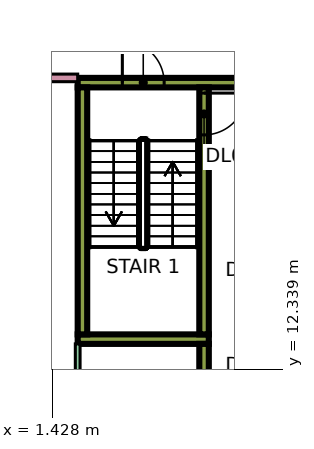
"""IFC4 building model, lengths in metres.
Left out: names, types, materials, properties, quantities, classifications, styles, units other than length and angle.
Written with IfcOpenShell. Run it as: python <this file> out.ifc"""

import sys

from ifc_helpers import new_model, si_unit, direction, frame, frame_2d, origin, place, context, subcontext, project, spatial, rectangle, extrude, element, fill, save


model = new_model("IFC4")
c1 = context("Model", 3, precision=1e-05, world=origin(), true_north=direction((0.0, 1.0)))
c2 = subcontext(c1, "Body", "Model", "MODEL_VIEW")
j1 = project(units=[si_unit("LENGTHUNIT", "METRE"), si_unit("PLANEANGLEUNIT", "RADIAN")], contexts=[c1])
p1 = place(None, origin())
s1 = spatial("IfcSite", under=j1, at=p1, CompositionType="ELEMENT")
p2 = place(p1, origin())
s2 = spatial("IfcBuilding", under=s1, at=p2, CompositionType="ELEMENT")
p3 = place(p2, origin())
s3 = spatial("IfcBuildingStorey", under=s2, at=p3, CompositionType="ELEMENT", Elevation=0.0)
p4 = place(p3, frame((2.1, 19.875, 0.0), z_axis=(0.0, 0.0, 1.0), x_axis=(1.0, 0.0, 0.0)))
e1 = element("IfcWall", 1, at=p4, inside=s3, PredefinedType="SHEAR", context=c2, shape_type="SweptSolid", body=[
    extrude(rectangle(XDim=6.9, YDim=0.25, at=frame_2d((3.45, 0.0))), origin(), (0.0, 0.0, 1.0), 7.2),
])
p5 = place(p4, frame((1.175, 0.0, 0.0)))
e2 = element("IfcOpeningElement", 2, at=p5, cuts=e1, PredefinedType="OPENING", context=c2, shape_type="SweptSolid", body=[
    extrude(rectangle(XDim=1.1, YDim=2.2, at=frame_2d((0.55, 1.1))), frame((0.0, 0.135, 0.0), z_axis=(0.0, -1.0, 0.0), x_axis=(1.0, 0.0, 0.0)), (0.0, 0.0, 1.0), 0.27),
])
p6 = place(p4, frame((4.6, 0.0, 0.0)))
e3 = element("IfcOpeningElement", 3, at=p6, cuts=e1, PredefinedType="OPENING", context=c2, shape_type="SweptSolid", body=[
    extrude(rectangle(XDim=1.2, YDim=2.2, at=frame_2d((0.6, 1.1))), frame((0.0, 0.135, 0.0), z_axis=(0.0, -1.0, 0.0), x_axis=(1.0, 0.0, 0.0)), (0.0, 0.0, 1.0), 0.27),
])
p7 = place(p3, frame((2.1, 13.125, 0.0), z_axis=(0.0, 0.0, 1.0), x_axis=(1.0, 0.0, 0.0)))
e4 = element("IfcWall", 4, at=p7, inside=s3, PredefinedType="SHEAR", context=c2, shape_type="SweptSolid", body=[
    extrude(rectangle(XDim=3.45, YDim=0.25, at=frame_2d((1.725, 0.0))), origin(), (0.0, 0.0, 1.0), 7.2),
])
p8 = place(p3, frame((2.225, 13.25, 0.0), z_axis=(0.0, 0.0, 1.0), x_axis=(0.0, 1.0, 0.0)))
e5 = element("IfcWall", 5, at=p8, inside=s3, PredefinedType="SHEAR", context=c2, shape_type="SweptSolid", body=[
    extrude(rectangle(XDim=6.5, YDim=0.25, at=frame_2d((3.25, 0.0))), origin(), (0.0, 0.0, 1.0), 7.2),
])
p9 = place(p3, frame((5.425, 13.25, 0.0), z_axis=(0.0, 0.0, 1.0), x_axis=(0.0, 1.0, 0.0)))
e6 = element("IfcWall", 6, at=p9, inside=s3, PredefinedType="SHEAR", context=c2, shape_type="SweptSolid", body=[
    extrude(rectangle(XDim=6.5, YDim=0.25, at=frame_2d((3.25, 0.0))), origin(), (0.0, 0.0, 1.0), 7.2),
])
p10 = place(p9, frame((5.25, 0.0, 0.0)))
e7 = element("IfcOpeningElement", 7, at=p10, cuts=e6, PredefinedType="OPENING", context=c2, shape_type="SweptSolid", body=[
    extrude(rectangle(XDim=1.1, YDim=2.2, at=frame_2d((0.55, 1.1))), frame((0.0, 0.135, 0.0), z_axis=(0.0, -1.0, 0.0), x_axis=(1.0, 0.0, 0.0)), (0.0, 0.0, 1.0), 0.27),
])
p11 = place(p3, frame((5.425, 9.0, 0.0), z_axis=(0.0, 0.0, 1.0), x_axis=(0.0, 1.0, 0.0)))
e8 = element("IfcWall", 8, at=p11, inside=s3, PredefinedType="SHEAR", context=c2, shape_type="SweptSolid", body=[
    extrude(rectangle(XDim=4.0, YDim=0.25, at=frame_2d((2.0, 0.0))), origin(), (0.0, 0.0, 1.0), 7.2),
])
p12 = place(p3, frame((-0.6, 20.0, 0.0), z_axis=(0.0, 0.0, 1.0), x_axis=(1.0, 0.0, 0.0)))
e9 = element("IfcWall", 9, at=p12, inside=s3, PredefinedType="PARTITIONING", context=c2, shape_type="SweptSolid", body=[
    extrude(rectangle(XDim=2.7, YDim=0.2, at=frame_2d((1.35, 0.0))), origin(), (0.0, 0.0, 1.0), 6.8),
])
p13 = place(p3, frame((2.1, 6.938, 0.0), z_axis=(0.0, 0.0, 1.0), x_axis=(0.0, 1.0, 0.0)))
e10 = element("IfcWall", 10, at=p13, inside=s3, PredefinedType="PARTITIONING", context=c2, shape_type="SweptSolid", body=[
    extrude(rectangle(XDim=6.062, YDim=0.125, at=frame_2d((3.031, 0.0))), origin(), (0.0, 0.0, 1.0), 6.8),
])
p14 = place(p10, origin())
e11 = element("IfcDoor", 11, at=p14, inside=s3, OperationType="SINGLE_SWING_RIGHT", PredefinedType="DOOR", context=c2, shape_type="SweptSolid", body=[
    extrude(rectangle(XDim=1.1, YDim=2.2, at=frame_2d((0.55, 1.1))), frame((0.0, 0.025, 0.0), z_axis=(0.0, -1.0, 0.0), x_axis=(1.0, 0.0, 0.0)), (0.0, 0.0, 1.0), 0.05),
])
fill(e7, e11)
p15 = place(p5, origin())
e12 = element("IfcDoor", 12, at=p15, inside=s3, OperationType="SINGLE_SWING_LEFT", PredefinedType="DOOR", context=c2, shape_type="SweptSolid", body=[
    extrude(rectangle(XDim=1.1, YDim=2.2, at=frame_2d((0.55, 1.1))), frame((0.0, 0.025, 0.0), z_axis=(0.0, -1.0, 0.0), x_axis=(1.0, 0.0, 0.0)), (0.0, 0.0, 1.0), 0.05),
])
fill(e2, e12)
save(model, sys.argv[1])
